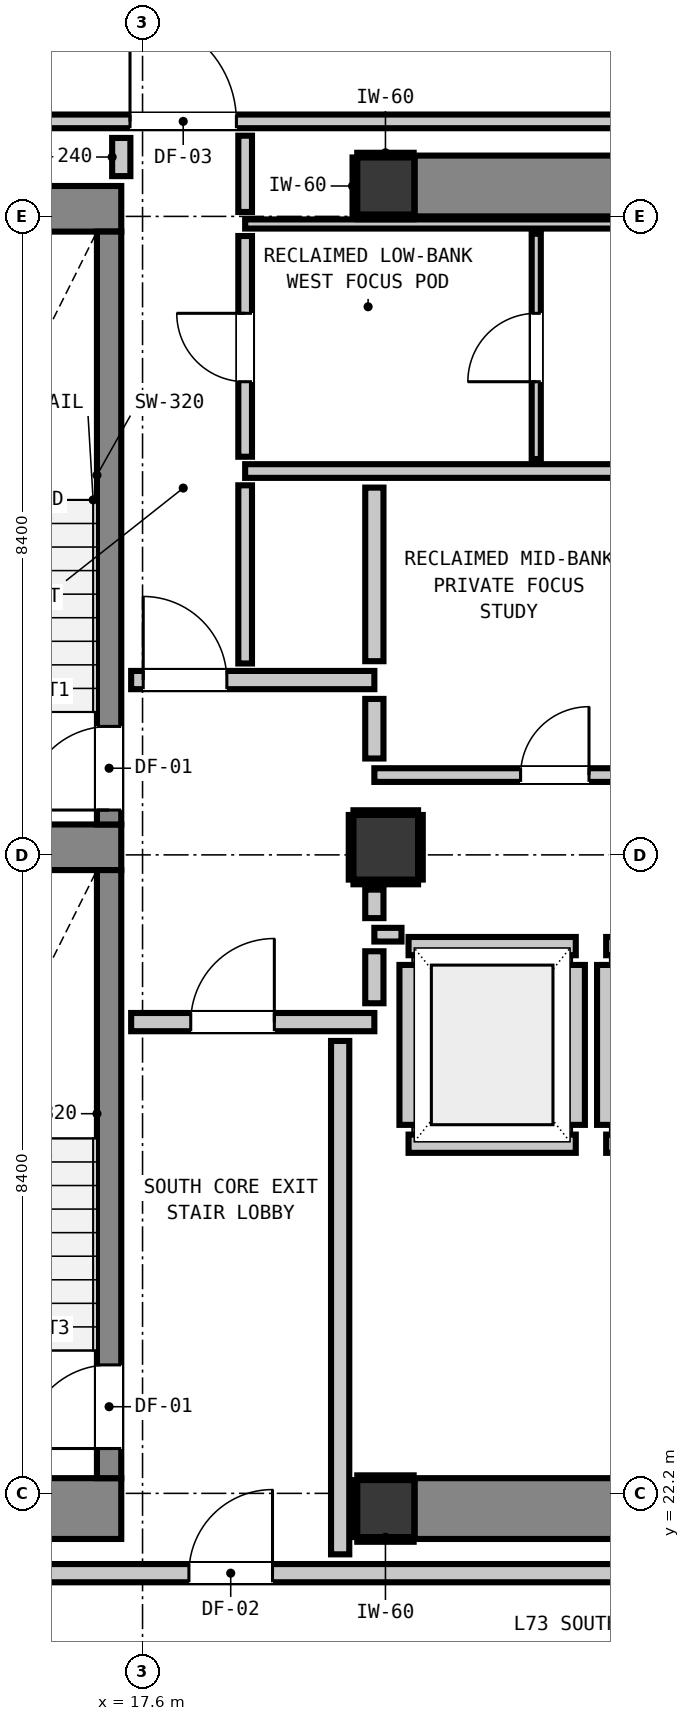
"""IFC4 building model, lengths in metres.
Left out: names, types, materials, properties, quantities, classifications, styles, units other than length and angle.
Written with IfcOpenShell. Run it as: python <this file> out.ifc"""

import sys

from ifc_helpers import new_model, si_unit, direction, frame, frame_2d, origin, origin_2d, place, context, subcontext, project, spatial, rectangle, extrude, element, fill, save


model = new_model("IFC4")
c1 = context("Model", 3, precision=1e-05, world=origin(), true_north=direction((0.0, 1.0)))
c2 = subcontext(c1, "Body", "Model", "MODEL_VIEW")
j1 = project(units=[si_unit("LENGTHUNIT", "METRE"), si_unit("PLANEANGLEUNIT", "RADIAN")], contexts=[c1])
p1 = place(None, origin())
s1 = spatial("IfcSite", under=j1, at=p1, CompositionType="ELEMENT")
p2 = place(p1, origin())
s2 = spatial("IfcBuilding", under=s1, at=p2, CompositionType="ELEMENT")
p3 = place(p2, frame((0.0, 0.0, 251.2)))
s3 = spatial("IfcBuildingStorey", under=s2, at=p3, CompositionType="ELEMENT", Elevation=251.2)
for number, where, z_axis, x_axis in (
    (1, (20.8, 22.0, 0.0), (0.0, 0.0, 1.0), (1.0, 0.0, 0.0)),
    (2, (20.8, 39.4, 0.0), (0.0, 0.0, 1.0), (1.0, 0.0, 0.0)),
):
    element("IfcColumn", number, at=place(p3, frame(where, z_axis=z_axis, x_axis=x_axis)), inside=s3, PredefinedType="COLUMN", context=c2, shape_type="SweptSolid", body=[
        extrude(rectangle(XDim=0.75, YDim=0.75, at=origin_2d()), origin(), (0.0, 0.0, 1.0), 3.32),
    ])
p4 = place(p3, frame((13.24, 22.0, 0.0), z_axis=(0.0, 0.0, 1.0), x_axis=(1.0, 0.0, 0.0)))
e3 = element("IfcWall", 3, at=p4, inside=s3, PredefinedType="SHEAR", context=c2, shape_type="SweptSolid", body=[
    extrude(rectangle(XDim=4.08, YDim=0.8, at=frame_2d((2.04, 0.0))), origin(), (0.0, 0.0, 1.0), 3.32),
])
p5 = place(p3, frame((13.24, 39.1, 0.0), z_axis=(0.0, 0.0, 1.0), x_axis=(1.0, 0.0, 0.0)))
e4 = element("IfcWall", 4, at=p5, inside=s3, PredefinedType="SHEAR", context=c2, shape_type="SweptSolid", body=[
    extrude(rectangle(XDim=4.08, YDim=0.6, at=frame_2d((2.04, 0.0))), origin(), (0.0, 0.0, 1.0), 3.32),
])
p6 = place(p3, frame((13.78, 30.7, 0.0), z_axis=(0.0, 0.0, 1.0), x_axis=(1.0, 0.0, 0.0)))
e5 = element("IfcWall", 5, at=p6, inside=s3, PredefinedType="SHEAR", context=c2, shape_type="SweptSolid", body=[
    extrude(rectangle(XDim=3.54, YDim=0.6, at=frame_2d((1.77, 0.0))), origin(), (0.0, 0.0, 1.0), 3.32),
])
for number, where, z_axis, x_axis in (
    (6, (21.18, 22.0, 0.0), (0.0, 0.0, 1.0), (1.0, 0.0, 0.0)),
    (7, (21.18, 39.4, 0.0), (0.0, 0.0, 1.0), (1.0, 0.0, 0.0)),
):
    element("IfcWall", number, at=place(p3, frame(where, z_axis=z_axis, x_axis=x_axis)), inside=s3, PredefinedType="SHEAR", context=c2, shape_type="SweptSolid", body=[
        extrude(rectangle(XDim=7.64, YDim=0.8, at=frame_2d((3.82, 0.0))), origin(), (0.0, 0.0, 1.0), 3.32),
    ])
p7 = place(p3, frame((17.16, 31.0, 0.0), z_axis=(0.0, 0.0, 1.0), x_axis=(0.0, 1.0, 0.0)))
e8 = element("IfcWall", 8, at=p7, inside=s3, PredefinedType="SHEAR", context=c2, shape_type="SweptSolid", body=[
    extrude(rectangle(XDim=7.8, YDim=0.32, at=frame_2d((3.9, 0.0))), origin(), (0.0, 0.0, 1.0), 3.32),
])
p8 = place(p7, frame((0.19, 0.0, 0.0)))
e9 = element("IfcOpeningElement", 9, at=p8, cuts=e8, PredefinedType="OPENING", context=c2, shape_type="SweptSolid", body=[
    extrude(rectangle(XDim=1.1, YDim=2.15, at=frame_2d((0.55, 1.075))), frame((0.0, 0.17, 0.0), z_axis=(0.0, -1.0, 0.0), x_axis=(1.0, 0.0, 0.0)), (0.0, 0.0, 1.0), 0.34),
])
p9 = place(p3, frame((17.16, 22.4, 0.0), z_axis=(0.0, 0.0, 1.0), x_axis=(0.0, 1.0, 0.0)))
e10 = element("IfcWall", 10, at=p9, inside=s3, PredefinedType="SHEAR", context=c2, shape_type="SweptSolid", body=[
    extrude(rectangle(XDim=8.0, YDim=0.32, at=frame_2d((4.0, 0.0))), origin(), (0.0, 0.0, 1.0), 3.32),
])
p10 = place(p9, frame((0.39, 0.0, 0.0)))
e11 = element("IfcOpeningElement", 11, at=p10, cuts=e10, PredefinedType="OPENING", context=c2, shape_type="SweptSolid", body=[
    extrude(rectangle(XDim=1.1, YDim=2.15, at=frame_2d((0.55, 1.075))), frame((0.0, 0.17, 0.0), z_axis=(0.0, -1.0, 0.0), x_axis=(1.0, 0.0, 0.0)), (0.0, 0.0, 1.0), 0.34),
])
p11 = place(p3, frame((20.8, 30.7, 0.0), z_axis=(0.0, 0.0, 1.0), x_axis=(1.0, 0.0, 0.0)))
e12 = element("IfcColumn", 12, at=p11, inside=s3, PredefinedType="COLUMN", context=c2, shape_type="SweptSolid", body=[
    extrude(rectangle(XDim=0.85, YDim=0.85, at=origin_2d()), origin(), (0.0, 0.0, 1.0), 3.32),
])
for number, where, z_axis, x_axis in (
    (13, (21.1, 26.8, 0.0), (0.0, 0.0, 1.0), (1.0, 0.0, 0.0)),
    (14, (21.1, 29.4, 0.0), (0.0, 0.0, 1.0), (1.0, 0.0, 0.0)),
):
    element("IfcWall", number, at=place(p3, frame(where, z_axis=z_axis, x_axis=x_axis)), inside=s3, PredefinedType="PARTITIONING", context=c2, shape_type="SweptSolid", body=[
        extrude(rectangle(XDim=2.2, YDim=0.24, at=frame_2d((1.1, 0.0))), origin(), (0.0, 0.0, 1.0), 3.1),
    ])
p12 = place(p3, frame((21.1, 27.048, 0.0), z_axis=(0.0, 0.0, 1.0), x_axis=(0.0, 1.0, 0.0)))
e15 = element("IfcWall", 15, at=p12, inside=s3, PredefinedType="PARTITIONING", context=c2, shape_type="SweptSolid", body=[
    extrude(rectangle(XDim=2.104, YDim=0.24, at=frame_2d((1.052, 0.0))), origin(), (0.0, 0.0, 1.0), 2.335),
])
p13 = place(p3, frame((23.3, 27.048, 0.0), z_axis=(0.0, 0.0, 1.0), x_axis=(0.0, 1.0, 0.0)))
e16 = element("IfcWall", 16, at=p13, inside=s3, PredefinedType="PARTITIONING", context=c2, shape_type="SweptSolid", body=[
    extrude(rectangle(XDim=2.104, YDim=0.24, at=frame_2d((1.052, 0.0))), origin(), (0.0, 0.0, 1.0), 3.1),
])
for number, where, z_axis, x_axis in (
    (17, (23.7, 26.8, 0.0), (0.0, 0.0, 1.0), (1.0, 0.0, 0.0)),
    (18, (23.7, 29.4, 0.0), (0.0, 0.0, 1.0), (1.0, 0.0, 0.0)),
):
    element("IfcWall", number, at=place(p3, frame(where, z_axis=z_axis, x_axis=x_axis)), inside=s3, PredefinedType="PARTITIONING", context=c2, shape_type="SweptSolid", body=[
        extrude(rectangle(XDim=2.2, YDim=0.24, at=frame_2d((1.1, 0.0))), origin(), (0.0, 0.0, 1.0), 3.1),
    ])
p14 = place(p3, frame((23.7, 27.048, 0.0), z_axis=(0.0, 0.0, 1.0), x_axis=(0.0, 1.0, 0.0)))
e19 = element("IfcWall", 19, at=p14, inside=s3, PredefinedType="PARTITIONING", context=c2, shape_type="SweptSolid", body=[
    extrude(rectangle(XDim=2.104, YDim=0.24, at=frame_2d((1.052, 0.0))), origin(), (0.0, 0.0, 1.0), 3.1),
])
p15 = place(p3, frame((13.012, 21.15, 0.0), z_axis=(0.0, 0.0, 1.0), x_axis=(1.0, 0.0, 0.0)))
e20 = element("IfcWall", 20, at=p15, inside=s3, PredefinedType="PARTITIONING", context=c2, shape_type="SweptSolid", body=[
    extrude(rectangle(XDim=28.201, YDim=0.24, at=frame_2d((14.101, 0.0))), origin(), (0.0, 0.0, 1.0), 3.1),
])
p16 = place(p15, frame((5.198, 0.0, 0.0)))
e21 = element("IfcOpeningElement", 21, at=p16, cuts=e20, PredefinedType="OPENING", context=c2, shape_type="SweptSolid", body=[
    extrude(rectangle(XDim=1.1, YDim=2.15, at=frame_2d((0.55, 1.075))), frame((0.0, 0.13, 0.0), z_axis=(0.0, -1.0, 0.0), x_axis=(1.0, 0.0, 0.0)), (0.0, 0.0, 1.0), 0.26),
])
p17 = place(p3, frame((17.45, 28.4, 0.0), z_axis=(0.0, 0.0, 1.0), x_axis=(1.0, 0.0, 0.0)))
e22 = element("IfcWall", 22, at=p17, inside=s3, PredefinedType="PARTITIONING", context=c2, shape_type="SweptSolid", body=[
    extrude(rectangle(XDim=3.2, YDim=0.24, at=frame_2d((1.6, 0.0))), origin(), (0.0, 0.0, 1.0), 3.1),
])
p18 = place(p17, frame((0.784, 0.0, 0.0)))
e23 = element("IfcOpeningElement", 23, at=p18, cuts=e22, PredefinedType="OPENING", context=c2, shape_type="SweptSolid", body=[
    extrude(rectangle(XDim=1.1, YDim=2.15, at=frame_2d((0.55, 1.075))), frame((0.0, 0.13, 0.0), z_axis=(0.0, -1.0, 0.0), x_axis=(1.0, 0.0, 0.0)), (0.0, 0.0, 1.0), 0.26),
])
p19 = place(p3, frame((17.45, 32.9, 0.0), z_axis=(0.0, 0.0, 1.0), x_axis=(1.0, 0.0, 0.0)))
e24 = element("IfcWall", 24, at=p19, inside=s3, PredefinedType="PARTITIONING", context=c2, shape_type="SweptSolid", body=[
    extrude(rectangle(XDim=3.2, YDim=0.24, at=frame_2d((1.6, 0.0))), origin(), (0.0, 0.0, 1.0), 3.1),
])
p20 = place(p19, frame((0.159, 0.0, 0.0)))
e25 = element("IfcOpeningElement", 25, at=p20, cuts=e24, PredefinedType="OPENING", context=c2, shape_type="SweptSolid", body=[
    extrude(rectangle(XDim=1.1, YDim=2.15, at=frame_2d((0.55, 1.075))), frame((0.0, 0.13, 0.0), z_axis=(0.0, -1.0, 0.0), x_axis=(1.0, 0.0, 0.0)), (0.0, 0.0, 1.0), 0.26),
])
p21 = place(p3, frame((20.65, 29.55, 0.0), z_axis=(0.0, 0.0, 1.0), x_axis=(1.0, 0.0, 0.0)))
e26 = element("IfcWall", 26, at=p21, inside=s3, PredefinedType="PARTITIONING", context=c2, shape_type="SweptSolid", body=[
    extrude(rectangle(XDim=0.357, YDim=0.18, at=frame_2d((0.179, 0.0))), origin(), (0.0, 0.0, 1.0), 3.1),
])
p22 = place(p3, frame((20.65, 31.65, 0.0), z_axis=(0.0, 0.0, 1.0), x_axis=(1.0, 0.0, 0.0)))
e27 = element("IfcWall", 27, at=p22, inside=s3, PredefinedType="PARTITIONING", context=c2, shape_type="SweptSolid", body=[
    extrude(rectangle(XDim=7.7, YDim=0.18, at=frame_2d((3.85, 0.0))), origin(), (0.0, 0.0, 1.0), 3.1),
])
p23 = place(p22, frame((1.924, 0.0, 0.0)))
e28 = element("IfcOpeningElement", 28, at=p23, cuts=e27, PredefinedType="OPENING", context=c2, shape_type="SweptSolid", body=[
    extrude(rectangle(XDim=0.9, YDim=2.1, at=frame_2d((0.45, 1.05))), frame((0.0, 0.1, 0.0), z_axis=(0.0, -1.0, 0.0), x_axis=(1.0, 0.0, 0.0)), (0.0, 0.0, 1.0), 0.2),
])
p24 = place(p3, frame((18.95, 35.65, 0.0), z_axis=(0.0, 0.0, 1.0), x_axis=(1.0, 0.0, 0.0)))
e29 = element("IfcWall", 29, at=p24, inside=s3, PredefinedType="PARTITIONING", context=c2, shape_type="SweptSolid", body=[
    extrude(rectangle(XDim=11.025, YDim=0.18, at=frame_2d((5.513, 0.0))), origin(), (0.0, 0.0, 1.0), 3.1),
])
p25 = place(p3, frame((4.587, 40.25, 0.0), z_axis=(0.0, 0.0, 1.0), x_axis=(1.0, 0.0, 0.0)))
e30 = element("IfcWall", 30, at=p25, inside=s3, PredefinedType="PARTITIONING", context=c2, shape_type="SweptSolid", body=[
    extrude(rectangle(XDim=36.626, YDim=0.18, at=frame_2d((18.313, 0.0))), origin(), (0.0, 0.0, 1.0), 3.1),
])
p26 = place(p25, frame((12.848, 0.0, 0.0)))
e31 = element("IfcOpeningElement", 31, at=p26, cuts=e30, PredefinedType="OPENING", context=c2, shape_type="SweptSolid", body=[
    extrude(rectangle(XDim=1.4, YDim=2.15, at=frame_2d((0.7, 1.075))), frame((0.0, 0.1, 0.0), z_axis=(0.0, -1.0, 0.0), x_axis=(1.0, 0.0, 0.0)), (0.0, 0.0, 1.0), 0.2),
])
p27 = place(p25, frame((4.723, 0.0, 0.0)))
e32 = element("IfcOpeningElement", 32, at=p27, cuts=e30, PredefinedType="OPENING", context=c2, shape_type="SweptSolid", body=[
    extrude(rectangle(XDim=1.0, YDim=2.15, at=frame_2d((0.5, 1.075))), frame((0.0, 0.1, 0.0), z_axis=(0.0, -1.0, 0.0), x_axis=(1.0, 0.0, 0.0)), (0.0, 0.0, 1.0), 0.2),
])
p28 = place(p3, frame((18.95, 38.9, 0.0), z_axis=(0.0, 0.0, 1.0), x_axis=(1.0, 0.0, 0.0)))
e33 = element("IfcWall", 33, at=p28, inside=s3, PredefinedType="PARTITIONING", context=c2, shape_type="SweptSolid", body=[
    extrude(rectangle(XDim=11.025, YDim=0.12, at=frame_2d((5.513, 0.0))), origin(), (0.0, 0.0, 1.0), 3.1),
])
p29 = place(p3, frame((17.32, 39.53, 0.0), z_axis=(0.0, 0.0, 1.0), x_axis=(0.0, 1.0, 0.0)))
e34 = element("IfcWall", 34, at=p29, inside=s3, PredefinedType="PARTITIONING", context=c2, shape_type="SweptSolid", body=[
    extrude(rectangle(XDim=0.502, YDim=0.24, at=frame_2d((0.251, 0.0))), origin(), (0.0, 0.0, 1.0), 3.1),
])
p30 = place(p3, frame((20.2, 21.398, 0.0), z_axis=(0.0, 0.0, 1.0), x_axis=(0.0, 1.0, 0.0)))
e35 = element("IfcWall", 35, at=p30, inside=s3, PredefinedType="PARTITIONING", context=c2, shape_type="SweptSolid", body=[
    extrude(rectangle(XDim=6.754, YDim=0.24, at=frame_2d((3.377, 0.0))), origin(), (0.0, 0.0, 1.0), 3.1),
])
p31 = place(p3, frame((20.65, 28.648, 0.0), z_axis=(0.0, 0.0, 1.0), x_axis=(0.0, 1.0, 0.0)))
e36 = element("IfcWall", 36, at=p31, inside=s3, PredefinedType="PARTITIONING", context=c2, shape_type="SweptSolid", body=[
    extrude(rectangle(XDim=0.684, YDim=0.24, at=frame_2d((0.342, 0.0))), origin(), (0.0, 0.0, 1.0), 2.335),
])
p32 = place(p3, frame((20.65, 29.768, 0.0), z_axis=(0.0, 0.0, 1.0), x_axis=(0.0, 1.0, 0.0)))
e37 = element("IfcWall", 37, at=p32, inside=s3, PredefinedType="PARTITIONING", context=c2, shape_type="SweptSolid", body=[
    extrude(rectangle(XDim=0.375, YDim=0.24, at=frame_2d((0.188, 0.0))), origin(), (0.0, 0.0, 1.0), 2.335),
])
p33 = place(p3, frame((20.65, 31.868, 0.0), z_axis=(0.0, 0.0, 1.0), x_axis=(0.0, 1.0, 0.0)))
e38 = element("IfcWall", 38, at=p33, inside=s3, PredefinedType="PARTITIONING", context=c2, shape_type="SweptSolid", body=[
    extrude(rectangle(XDim=0.784, YDim=0.24, at=frame_2d((0.392, 0.0))), origin(), (0.0, 0.0, 1.0), 2.335),
])
p34 = place(p3, frame((20.65, 33.148, 0.0), z_axis=(0.0, 0.0, 1.0), x_axis=(0.0, 1.0, 0.0)))
e39 = element("IfcWall", 39, at=p34, inside=s3, PredefinedType="PARTITIONING", context=c2, shape_type="SweptSolid", body=[
    extrude(rectangle(XDim=2.284, YDim=0.24, at=frame_2d((1.142, 0.0))), origin(), (0.0, 0.0, 1.0), 2.335),
])
p35 = place(p3, frame((18.95, 33.118, 0.0), z_axis=(0.0, 0.0, 1.0), x_axis=(0.0, 1.0, 0.0)))
e40 = element("IfcWall", 40, at=p35, inside=s3, PredefinedType="PARTITIONING", context=c2, shape_type="SweptSolid", body=[
    extrude(rectangle(XDim=2.344, YDim=0.18, at=frame_2d((1.172, 0.0))), origin(), (0.0, 0.0, 1.0), 3.1),
])
p36 = place(p3, frame((18.95, 35.838, 0.0), z_axis=(0.0, 0.0, 1.0), x_axis=(0.0, 1.0, 0.0)))
e41 = element("IfcWall", 41, at=p36, inside=s3, PredefinedType="PARTITIONING", context=c2, shape_type="SweptSolid", body=[
    extrude(rectangle(XDim=2.904, YDim=0.18, at=frame_2d((1.452, 0.0))), origin(), (0.0, 0.0, 1.0), 3.1),
])
p37 = place(p36, frame((0.987, 0.0, 0.0)))
e42 = element("IfcOpeningElement", 42, at=p37, cuts=e41, PredefinedType="OPENING", context=c2, shape_type="SweptSolid", body=[
    extrude(rectangle(XDim=0.9, YDim=2.1, at=frame_2d((0.45, 1.05))), frame((0.0, 0.1, 0.0), z_axis=(0.0, -1.0, 0.0), x_axis=(1.0, 0.0, 0.0)), (0.0, 0.0, 1.0), 0.2),
])
p38 = place(p3, frame((18.95, 39.058, 0.0), z_axis=(0.0, 0.0, 1.0), x_axis=(0.0, 1.0, 0.0)))
e43 = element("IfcWall", 43, at=p38, inside=s3, PredefinedType="PARTITIONING", context=c2, shape_type="SweptSolid", body=[
    extrude(rectangle(XDim=1.004, YDim=0.18, at=frame_2d((0.502, 0.0))), origin(), (0.0, 0.0, 1.0), 3.1),
])
p39 = place(p3, frame((22.78, 35.808, 0.0), z_axis=(0.0, 0.0, 1.0), x_axis=(0.0, 1.0, 0.0)))
e44 = element("IfcWall", 44, at=p39, inside=s3, PredefinedType="PARTITIONING", context=c2, shape_type="SweptSolid", body=[
    extrude(rectangle(XDim=2.964, YDim=0.12, at=frame_2d((1.482, 0.0))), origin(), (0.0, 0.0, 1.0), 3.1),
])
p40 = place(p39, frame((1.017, 0.0, 0.0)))
e45 = element("IfcOpeningElement", 45, at=p40, cuts=e44, PredefinedType="OPENING", context=c2, shape_type="SweptSolid", body=[
    extrude(rectangle(XDim=0.9, YDim=2.1, at=frame_2d((0.45, 1.05))), frame((0.0, 0.07, 0.0), z_axis=(0.0, -1.0, 0.0), x_axis=(1.0, 0.0, 0.0)), (0.0, 0.0, 1.0), 0.14),
])
for number, where, z_axis, x_axis in (
    (46, (20.425, 21.593, 0.0), (0.0, 0.0, 1.0), (1.0, 0.0, 0.0)),
    (47, (20.425, 22.407, 0.0), (0.0, 0.0, 1.0), (1.0, 0.0, 0.0)),
):
    element("IfcWall", number, at=place(p3, frame(where, z_axis=z_axis, x_axis=x_axis)), inside=s3, PredefinedType="PARTITIONING", context=c2, shape_type="SweptSolid", body=[
        extrude(rectangle(XDim=0.742, YDim=0.06, at=frame_2d((0.371, 0.0))), origin(), (0.0, 0.0, 1.0), 1.45),
    ])
p41 = place(p3, frame((20.393, 21.625, 0.0), z_axis=(0.0, 0.0, 1.0), x_axis=(0.0, 1.0, 0.0)))
e48 = element("IfcWall", 48, at=p41, inside=s3, PredefinedType="PARTITIONING", context=c2, shape_type="SweptSolid", body=[
    extrude(rectangle(XDim=0.75, YDim=0.06, at=frame_2d((0.375, 0.0))), origin(), (0.0, 0.0, 1.0), 1.45),
])
for number, where, z_axis, x_axis in (
    (49, (20.425, 38.993, 0.0), (0.0, 0.0, 1.0), (1.0, 0.0, 0.0)),
    (50, (20.425, 39.807, 0.0), (0.0, 0.0, 1.0), (1.0, 0.0, 0.0)),
):
    element("IfcWall", number, at=place(p3, frame(where, z_axis=z_axis, x_axis=x_axis)), inside=s3, PredefinedType="PARTITIONING", context=c2, shape_type="SweptSolid", body=[
        extrude(rectangle(XDim=0.742, YDim=0.06, at=frame_2d((0.371, 0.0))), origin(), (0.0, 0.0, 1.0), 1.45),
    ])
p42 = place(p3, frame((20.393, 39.025, 0.0), z_axis=(0.0, 0.0, 1.0), x_axis=(0.0, 1.0, 0.0)))
e51 = element("IfcWall", 51, at=p42, inside=s3, PredefinedType="PARTITIONING", context=c2, shape_type="SweptSolid", body=[
    extrude(rectangle(XDim=0.75, YDim=0.06, at=frame_2d((0.375, 0.0))), origin(), (0.0, 0.0, 1.0), 1.45),
])
for number, where, z_axis, x_axis in (
    (52, (20.375, 30.243, 0.0), (0.0, 0.0, 1.0), (1.0, 0.0, 0.0)),
    (53, (20.375, 31.157, 0.0), (0.0, 0.0, 1.0), (1.0, 0.0, 0.0)),
    (54, (20.343, 30.275, 0.0), (0.0, 0.0, 1.0), (0.0, 1.0, 0.0)),
    (55, (21.257, 30.275, 0.0), (0.0, 0.0, 1.0), (0.0, 1.0, 0.0)),
):
    element("IfcWall", number, at=place(p3, frame(where, z_axis=z_axis, x_axis=x_axis)), inside=s3, PredefinedType="PARTITIONING", context=c2, shape_type="SweptSolid", body=[
        extrude(rectangle(XDim=0.85, YDim=0.06, at=frame_2d((0.425, 0.0))), origin(), (0.0, 0.0, 1.0), 1.45),
    ])
p43 = place(p8, origin())
e56 = element("IfcDoor", 56, at=p43, inside=s3, OperationType="SINGLE_SWING_LEFT", PredefinedType="DOOR", context=c2, shape_type="SweptSolid", body=[
    extrude(rectangle(XDim=1.1, YDim=2.15, at=frame_2d((0.55, 1.075))), frame((0.0, 0.025, 0.0), z_axis=(0.0, -1.0, 0.0), x_axis=(1.0, 0.0, 0.0)), (0.0, 0.0, 1.0), 0.05),
])
fill(e9, e56)
p44 = place(p10, origin())
e57 = element("IfcDoor", 57, at=p44, inside=s3, OperationType="SINGLE_SWING_LEFT", PredefinedType="DOOR", context=c2, shape_type="SweptSolid", body=[
    extrude(rectangle(XDim=1.1, YDim=2.15, at=frame_2d((0.55, 1.075))), frame((0.0, 0.025, 0.0), z_axis=(0.0, -1.0, 0.0), x_axis=(1.0, 0.0, 0.0)), (0.0, 0.0, 1.0), 0.05),
])
fill(e11, e57)
p45 = place(p18, origin())
e58 = element("IfcDoor", 58, at=p45, inside=s3, OperationType="SINGLE_SWING_RIGHT", PredefinedType="DOOR", context=c2, shape_type="SweptSolid", body=[
    extrude(rectangle(XDim=1.1, YDim=2.15, at=frame_2d((0.55, 1.075))), frame((0.0, 0.025, 0.0), z_axis=(0.0, -1.0, 0.0), x_axis=(1.0, 0.0, 0.0)), (0.0, 0.0, 1.0), 0.05),
])
fill(e23, e58)
p46 = place(p20, origin())
e59 = element("IfcDoor", 59, at=p46, inside=s3, OperationType="SINGLE_SWING_LEFT", PredefinedType="DOOR", context=c2, shape_type="SweptSolid", body=[
    extrude(rectangle(XDim=1.1, YDim=2.15, at=frame_2d((0.55, 1.075))), frame((0.0, 0.025, 0.0), z_axis=(0.0, -1.0, 0.0), x_axis=(1.0, 0.0, 0.0)), (0.0, 0.0, 1.0), 0.05),
])
fill(e25, e59)
p47 = place(p16, origin())
e60 = element("IfcDoor", 60, at=p47, inside=s3, OperationType="SINGLE_SWING_RIGHT", PredefinedType="DOOR", context=c2, shape_type="SweptSolid", body=[
    extrude(rectangle(XDim=1.1, YDim=2.15, at=frame_2d((0.55, 1.075))), frame((0.0, 0.025, 0.0), z_axis=(0.0, -1.0, 0.0), x_axis=(1.0, 0.0, 0.0)), (0.0, 0.0, 1.0), 0.05),
])
fill(e21, e60)
p48 = place(p26, origin())
e61 = element("IfcDoor", 61, at=p48, inside=s3, OperationType="SINGLE_SWING_LEFT", PredefinedType="DOOR", context=c2, shape_type="SweptSolid", body=[
    extrude(rectangle(XDim=1.4, YDim=2.15, at=frame_2d((0.7, 1.075))), frame((0.0, 0.025, 0.0), z_axis=(0.0, -1.0, 0.0), x_axis=(1.0, 0.0, 0.0)), (0.0, 0.0, 1.0), 0.05),
])
fill(e31, e61)
p49 = place(p37, origin())
e62 = element("IfcDoor", 62, at=p49, inside=s3, OperationType="SINGLE_SWING_RIGHT", PredefinedType="DOOR", context=c2, shape_type="SweptSolid", body=[
    extrude(rectangle(XDim=0.9, YDim=2.1, at=frame_2d((0.45, 1.05))), frame((0.0, 0.025, 0.0), z_axis=(0.0, -1.0, 0.0), x_axis=(1.0, 0.0, 0.0)), (0.0, 0.0, 1.0), 0.05),
])
fill(e42, e62)
p50 = place(p40, origin())
e63 = element("IfcDoor", 63, at=p50, inside=s3, OperationType="SINGLE_SWING_LEFT", PredefinedType="DOOR", context=c2, shape_type="SweptSolid", body=[
    extrude(rectangle(XDim=0.9, YDim=2.1, at=frame_2d((0.45, 1.05))), frame((0.0, 0.025, 0.0), z_axis=(0.0, -1.0, 0.0), x_axis=(1.0, 0.0, 0.0)), (0.0, 0.0, 1.0), 0.05),
])
fill(e45, e63)
p51 = place(p23, origin())
e64 = element("IfcDoor", 64, at=p51, inside=s3, OperationType="SINGLE_SWING_RIGHT", PredefinedType="DOOR", context=c2, shape_type="SweptSolid", body=[
    extrude(rectangle(XDim=0.9, YDim=2.1, at=frame_2d((0.45, 1.05))), frame((0.0, 0.025, 0.0), z_axis=(0.0, -1.0, 0.0), x_axis=(1.0, 0.0, 0.0)), (0.0, 0.0, 1.0), 0.05),
])
fill(e28, e64)
save(model, sys.argv[1])
